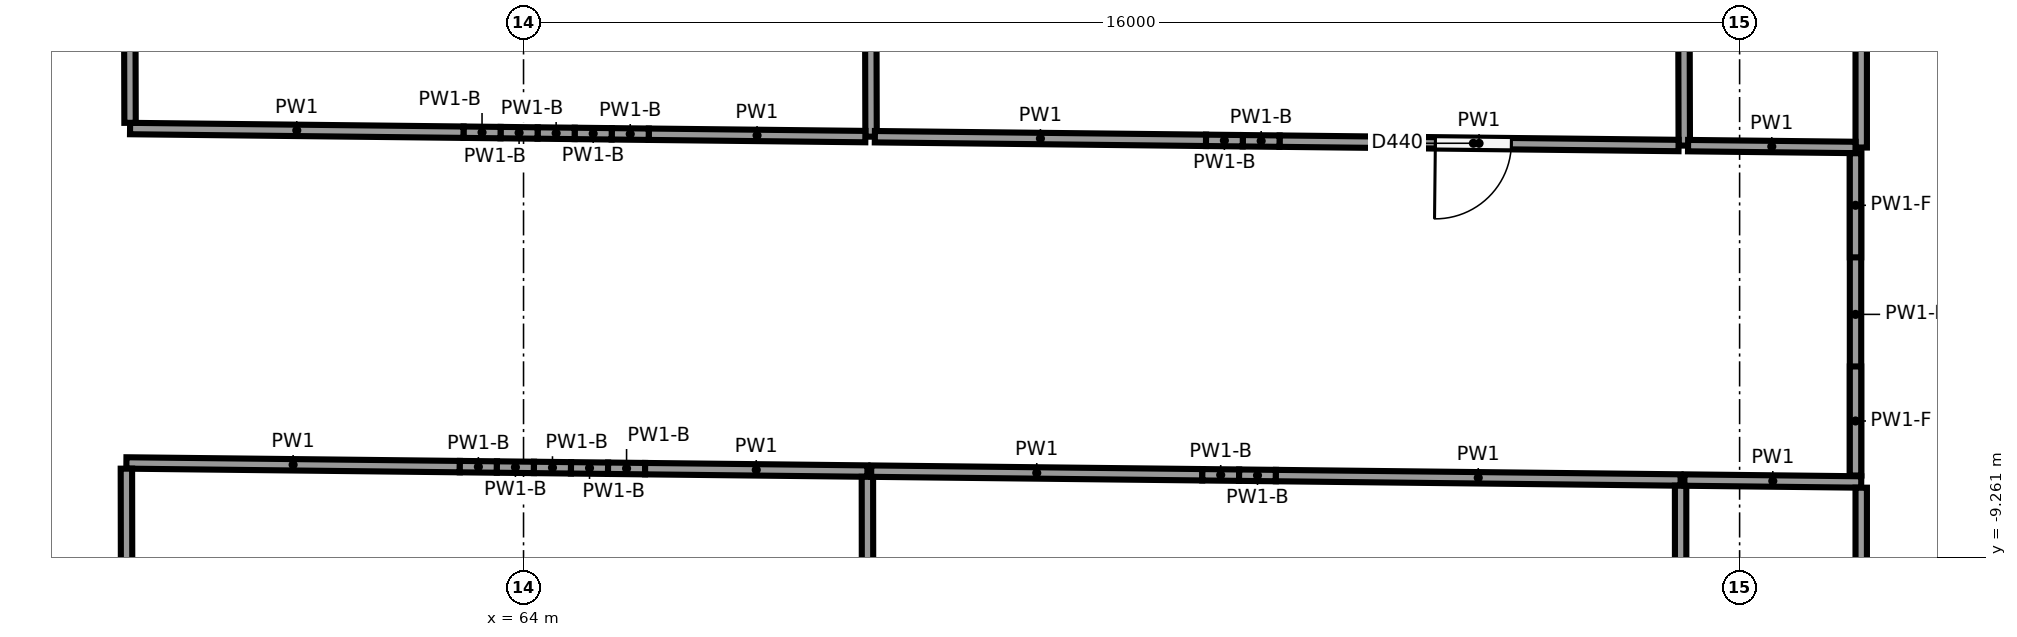
"""IFC4 building model, lengths in metres.
Left out: names, types, materials, properties, quantities, classifications, styles, units other than length and angle.
Written with IfcOpenShell. Run it as: python <this file> out.ifc"""

import sys

from ifc_helpers import new_model, si_unit, direction, frame, frame_2d, origin, origin_2d, place, context, subcontext, project, spatial, rectangle, circle, extrude, element, fill, save


model = new_model("IFC4")
c1 = context("Model", 3, precision=1e-05, world=origin(), true_north=direction((0.0, 1.0)))
c2 = subcontext(c1, "Body", "Model", "MODEL_VIEW")
j1 = project(units=[si_unit("LENGTHUNIT", "METRE"), si_unit("PLANEANGLEUNIT", "RADIAN")], contexts=[c1])
p1 = place(None, origin())
s1 = spatial("IfcSite", under=j1, at=p1, CompositionType="ELEMENT")
p2 = place(p1, origin())
s2 = spatial("IfcBuilding", under=s1, at=p2, CompositionType="ELEMENT")
p3 = place(p2, frame((0.0, 0.0, -4.0)))
s3 = spatial("IfcBuildingStorey", under=s2, at=p3, CompositionType="ELEMENT", Elevation=-4.0)
for number, where, z_axis, x_axis in (
    (1, (58.399, -5.816, -0.4), (0.0, 0.0, 1.0), (1.0, 0.0, 0.0)),
    (2, (63.599, -5.873, -0.4), (0.0, 0.0, 1.0), (1.0, 0.0, 0.0)),
):
    element("IfcColumn", number, at=place(p3, frame(where, z_axis=z_axis, x_axis=x_axis)), inside=s3, PredefinedType="COLUMN", context=c2, shape_type="SweptSolid", body=[
        extrude(circle(Radius=0.45, at=origin_2d()), origin(), (0.0, 0.0, 1.0), 4.4),
    ])
p4 = place(p3, frame((64.899, -5.887, -0.4), z_axis=(0.0, 0.0, 1.0), x_axis=(1.0, 0.0, 0.0)))
e3 = element("IfcColumn", 3, at=p4, inside=s3, PredefinedType="COLUMN", context=c2, shape_type="SweptSolid", body=[
    extrude(circle(Radius=0.4, at=origin_2d()), origin(), (0.0, 0.0, 1.0), 4.4),
])
p5 = place(p3, frame((73.498, -5.981, -0.4), z_axis=(0.0, 0.0, 1.0), x_axis=(1.0, 0.0, 0.0)))
e4 = element("IfcColumn", 4, at=p5, inside=s3, PredefinedType="COLUMN", context=c2, shape_type="SweptSolid", body=[
    extrude(circle(Radius=0.45, at=origin_2d()), origin(), (0.0, 0.0, 1.0), 4.4),
])
p6 = place(p3, frame((58.775, -8.02, 0.0), z_axis=(0.0, 0.0, 1.0), x_axis=(0.999939914849, -0.010962056941, 0.0)))
e5 = element("IfcWall", 5, at=p6, inside=s3, PredefinedType="PARTITIONING", context=c2, shape_type="SweptSolid", body=[
    extrude(rectangle(XDim=4.387, YDim=0.15, at=frame_2d((2.194, 0.0))), origin(), (0.0, 0.0, 1.0), 3.6),
])
p7 = place(p3, frame((63.162, -8.068, 0.0), z_axis=(0.0, 0.0, 1.0), x_axis=(0.999939262806, -0.01102137464, 0.0)))
e6 = element("IfcWall", 6, at=p7, inside=s3, PredefinedType="PARTITIONING", context=c2, shape_type="SweptSolid", body=[
    extrude(rectangle(XDim=0.487, YDim=0.15, at=frame_2d((0.244, 0.0))), origin(), (0.0, 0.0, 1.0), 2.5),
])
for number, where, z_axis, x_axis in (
    (7, (63.649, -8.073, 0.0), (0.0, 0.0, 1.0), (1.0, -0.011, 0.0)),
    (8, (64.137, -8.079, 0.0), (0.0, 0.0, 1.0), (1.0, -0.011, 0.0)),
):
    element("IfcWall", number, at=place(p3, frame(where, z_axis=z_axis, x_axis=x_axis)), inside=s3, PredefinedType="PARTITIONING", context=c2, shape_type="SweptSolid", body=[
        extrude(rectangle(XDim=0.488, YDim=0.15, at=frame_2d((0.244, 0.0))), origin(), (0.0, 0.0, 1.0), 2.5),
    ])
p8 = place(p3, frame((64.625, -8.084, 0.0), z_axis=(0.0, 0.0, 1.0), x_axis=(0.999939262806, -0.01102137464, 0.0)))
e9 = element("IfcWall", 9, at=p8, inside=s3, PredefinedType="PARTITIONING", context=c2, shape_type="SweptSolid", body=[
    extrude(rectangle(XDim=0.487, YDim=0.15, at=frame_2d((0.244, 0.0))), origin(), (0.0, 0.0, 1.0), 2.5),
])
p9 = place(p3, frame((65.112, -8.09, 0.0), z_axis=(0.0, 0.0, 1.0), x_axis=(0.999939323614, -0.011015856344, 0.0)))
e10 = element("IfcWall", 10, at=p9, inside=s3, PredefinedType="PARTITIONING", context=c2, shape_type="SweptSolid", body=[
    extrude(rectangle(XDim=0.488, YDim=0.15, at=frame_2d((0.244, 0.0))), origin(), (0.0, 0.0, 1.0), 2.5),
])
p10 = place(p3, frame((65.599, -8.095, 0.0), z_axis=(0.0, 0.0, 1.0), x_axis=(0.999940219435, -0.010934237792, 0.0)))
e11 = element("IfcWall", 11, at=p10, inside=s3, PredefinedType="PARTITIONING", context=c2, shape_type="SweptSolid", body=[
    extrude(rectangle(XDim=2.925, YDim=0.15, at=frame_2d((1.462, 0.0))), origin(), (0.0, 0.0, 1.0), 3.6),
])
p11 = place(p3, frame((68.524, -8.202, 0.0), z_axis=(0.0, 0.0, 1.0), x_axis=(0.001127273963, -0.999999364627, 0.0)))
e12 = element("IfcWall", 12, at=p11, inside=s3, PredefinedType="PARTITIONING", context=c2, shape_type="SweptSolid", body=[
    extrude(rectangle(XDim=9.096, YDim=0.15, at=frame_2d((4.548, 0.0))), origin(), (0.0, 0.0, 1.0), 3.6),
])
p12 = place(p3, frame((58.79, -16.963, 0.0), z_axis=(0.0, 0.0, 1.0), x_axis=(-0.001651752736, 0.999998635856, 0.0)))
e13 = element("IfcWall", 13, at=p12, inside=s3, PredefinedType="PARTITIONING", context=c2, shape_type="SweptSolid", body=[
    extrude(rectangle(XDim=8.868, YDim=0.15, at=frame_2d((4.434, 0.0))), origin(), (0.0, 0.0, 1.0), 3.6),
])
p13 = place(p3, frame((68.574, -8.127, 0.0), z_axis=(0.0, 0.0, 1.0), x_axis=(0.999939687164, -0.010982806315, 0.0)))
e14 = element("IfcWall", 14, at=p13, inside=s3, PredefinedType="PARTITIONING", context=c2, shape_type="SweptSolid", body=[
    extrude(rectangle(XDim=4.357, YDim=0.15, at=frame_2d((2.178, 0.0))), origin(), (0.0, 0.0, 1.0), 3.6),
])
p14 = place(p3, frame((72.931, -8.175, 0.0), z_axis=(0.0, 0.0, 1.0), x_axis=(0.999938401812, -0.011099215358, 0.0)))
e15 = element("IfcWall", 15, at=p14, inside=s3, PredefinedType="PARTITIONING", context=c2, shape_type="SweptSolid", body=[
    extrude(rectangle(XDim=0.484, YDim=0.15, at=frame_2d((0.242, 0.0))), origin(), (0.0, 0.0, 1.0), 2.5),
])
p15 = place(p3, frame((73.415, -8.181, 0.0), z_axis=(0.0, 0.0, 1.0), x_axis=(0.999943930506, -0.010589421352, 0.0)))
e16 = element("IfcWall", 16, at=p15, inside=s3, PredefinedType="PARTITIONING", context=c2, shape_type="SweptSolid", body=[
    extrude(rectangle(XDim=0.484, YDim=0.15, at=frame_2d((0.242, 0.0))), origin(), (0.0, 0.0, 1.0), 2.5),
])
p16 = place(p3, frame((73.899, -8.186, 0.0), z_axis=(0.0, 0.0, 1.0), x_axis=(0.999939460098, -0.011003460359, 0.0)))
e17 = element("IfcWall", 17, at=p16, inside=s3, PredefinedType="PARTITIONING", context=c2, shape_type="SweptSolid", body=[
    extrude(rectangle(XDim=5.325, YDim=0.15, at=frame_2d((2.663, 0.0))), origin(), (0.0, 0.0, 1.0), 3.6),
])
p17 = place(p3, frame((79.224, -8.319, 0.0), z_axis=(0.0, 0.0, 1.0), x_axis=(0.00057636878, -0.9999998339, 0.0)))
e18 = element("IfcWall", 18, at=p17, inside=s3, PredefinedType="PARTITIONING", context=c2, shape_type="SweptSolid", body=[
    extrude(rectangle(XDim=9.319, YDim=0.15, at=frame_2d((4.659, 0.0))), origin(), (0.0, 0.0, 1.0), 3.6),
])
p18 = place(p3, frame((79.274, -8.245, 0.0), z_axis=(0.0, 0.0, 1.0), x_axis=(0.999940447056, -0.010913401878, 0.0)))
e19 = element("IfcWall", 19, at=p18, inside=s3, PredefinedType="PARTITIONING", context=c2, shape_type="SweptSolid", body=[
    extrude(rectangle(XDim=2.327, YDim=0.15, at=frame_2d((1.163, 0.0))), origin(), (0.0, 0.0, 1.0), 3.6),
])
p19 = place(p3, frame((81.6, -8.345, 0.0), z_axis=(0.0, 0.0, 1.0), x_axis=(0.0, -1.0, 0.0)))
e20 = element("IfcWall", 20, at=p19, inside=s3, PredefinedType="PARTITIONING", context=c2, shape_type="SweptSolid", body=[
    extrude(rectangle(XDim=4.805, YDim=0.15, at=frame_2d((2.402, 0.0))), origin(), (0.0, 0.0, 1.0), 3.6),
])
p20 = place(p19, frame((1.95, 0.0, 0.0)))
e21 = element("IfcOpeningElement", 21, at=p20, cuts=e20, PredefinedType="OPENING", context=c2, shape_type="SweptSolid", body=[
    extrude(rectangle(XDim=1.0, YDim=2.1, at=frame_2d((0.5, 1.05))), frame((0.0, 0.085, 0.0), z_axis=(0.0, -1.0, 0.0), x_axis=(1.0, 0.0, 0.0)), (0.0, 0.0, 1.0), 0.17),
])
p21 = place(p3, frame((68.55, 5.444, 0.0), z_axis=(0.0, 0.0, 1.0), x_axis=(0.002502188243, -0.999996869522, 0.0)))
e22 = element("IfcWall", 22, at=p21, inside=s3, PredefinedType="PARTITIONING", context=c2, shape_type="SweptSolid", body=[
    extrude(rectangle(XDim=9.172, YDim=0.15, at=frame_2d((4.586, 0.0))), origin(), (0.0, 0.0, 1.0), 3.6),
])
p22 = place(p3, frame((68.498, -3.726, 0.0), z_axis=(0.0, 0.0, 1.0), x_axis=(-0.999939884591, 0.01096481669, 0.0)))
e23 = element("IfcWall", 23, at=p22, inside=s3, PredefinedType="PARTITIONING", context=c2, shape_type="SweptSolid", body=[
    extrude(rectangle(XDim=2.85, YDim=0.15, at=frame_2d((1.425, 0.0))), origin(), (0.0, 0.0, 1.0), 3.6),
])
for number, where, z_axis, x_axis in (
    (24, (65.648, -3.695, 0.0), (0.0, 0.0, 1.0), (-1.0, 0.011, 0.0)),
    (25, (65.16, -3.69, 0.0), (0.0, 0.0, 1.0), (-1.0, 0.011, 0.0)),
):
    element("IfcWall", number, at=place(p3, frame(where, z_axis=z_axis, x_axis=x_axis)), inside=s3, PredefinedType="PARTITIONING", context=c2, shape_type="SweptSolid", body=[
        extrude(rectangle(XDim=0.488, YDim=0.15, at=frame_2d((0.244, 0.0))), origin(), (0.0, 0.0, 1.0), 2.5),
    ])
p23 = place(p3, frame((64.673, -3.684, 0.0), z_axis=(0.0, 0.0, 1.0), x_axis=(-0.999944658431, 0.010520459833, 0.0)))
e26 = element("IfcWall", 26, at=p23, inside=s3, PredefinedType="PARTITIONING", context=c2, shape_type="SweptSolid", body=[
    extrude(rectangle(XDim=0.487, YDim=0.15, at=frame_2d((0.244, 0.0))), origin(), (0.0, 0.0, 1.0), 2.5),
])
for number, where, z_axis, x_axis in (
    (27, (64.185, -3.679, 0.0), (0.0, 0.0, 1.0), (-1.0, 0.012, 0.0)),
    (28, (63.698, -3.674, 0.0), (0.0, 0.0, 1.0), (-1.0, 0.011, 0.0)),
):
    element("IfcWall", number, at=place(p3, frame(where, z_axis=z_axis, x_axis=x_axis)), inside=s3, PredefinedType="PARTITIONING", context=c2, shape_type="SweptSolid", body=[
        extrude(rectangle(XDim=0.488, YDim=0.15, at=frame_2d((0.244, 0.0))), origin(), (0.0, 0.0, 1.0), 2.5),
    ])
p24 = place(p3, frame((63.21, -3.668, 0.0), z_axis=(0.0, 0.0, 1.0), x_axis=(-0.999939914849, 0.010962056941, 0.0)))
e29 = element("IfcWall", 29, at=p24, inside=s3, PredefinedType="PARTITIONING", context=c2, shape_type="SweptSolid", body=[
    extrude(rectangle(XDim=4.387, YDim=0.15, at=frame_2d((2.194, 0.0))), origin(), (0.0, 0.0, 1.0), 3.6),
])
p25 = place(p3, frame((58.823, -3.545, 0.0), z_axis=(0.0, 0.0, 1.0), x_axis=(-0.002560141365, 0.999996722833, 0.0)))
e30 = element("IfcWall", 30, at=p25, inside=s3, PredefinedType="PARTITIONING", context=c2, shape_type="SweptSolid", body=[
    extrude(rectangle(XDim=8.869, YDim=0.15, at=frame_2d((4.434, 0.0))), origin(), (0.0, 0.0, 1.0), 3.6),
])
p26 = place(p25, frame((3.95, 0.0, 0.0)))
e31 = element("IfcOpeningElement", 31, at=p26, cuts=e30, PredefinedType="OPENING", context=c2, shape_type="SweptSolid", body=[
    extrude(rectangle(XDim=1.0, YDim=2.1, at=frame_2d((0.5, 1.05))), frame((0.0, 0.085, 0.0), z_axis=(0.0, -1.0, 0.0), x_axis=(1.0, 0.0, 0.0)), (0.0, 0.0, 1.0), 0.17),
])
p27 = place(p3, frame((79.249, 5.55, 0.0), z_axis=(0.0, 0.0, 1.0), x_axis=(0.002442883638, -0.999997016155, 0.0)))
e32 = element("IfcWall", 32, at=p27, inside=s3, PredefinedType="PARTITIONING", context=c2, shape_type="SweptSolid", body=[
    extrude(rectangle(XDim=9.394, YDim=0.15, at=frame_2d((4.697, 0.0))), origin(), (0.0, 0.0, 1.0), 3.6),
])
p28 = place(p3, frame((79.197, -3.844, 0.0), z_axis=(0.0, 0.0, 1.0), x_axis=(-0.999939777793, 0.010974551809, 0.0)))
e33 = element("IfcWall", 33, at=p28, inside=s3, PredefinedType="PARTITIONING", context=c2, shape_type="SweptSolid", body=[
    extrude(rectangle(XDim=5.25, YDim=0.15, at=frame_2d((2.625, 0.0))), origin(), (0.0, 0.0, 1.0), 3.6),
])
p29 = place(p28, frame((2.2, 0.0, 0.0)))
e34 = element("IfcOpeningElement", 34, at=p29, cuts=e33, PredefinedType="OPENING", context=c2, shape_type="SweptSolid", body=[
    extrude(rectangle(XDim=1.0, YDim=2.1, at=frame_2d((0.5, 1.05))), frame((0.0, 0.085, 0.0), z_axis=(0.0, -1.0, 0.0), x_axis=(1.0, 0.0, 0.0)), (0.0, 0.0, 1.0), 0.17),
])
p30 = place(p3, frame((73.947, -3.786, 0.0), z_axis=(0.0, 0.0, 1.0), x_axis=(-0.999938401812, 0.011099215358, 0.0)))
e35 = element("IfcWall", 35, at=p30, inside=s3, PredefinedType="PARTITIONING", context=c2, shape_type="SweptSolid", body=[
    extrude(rectangle(XDim=0.484, YDim=0.15, at=frame_2d((0.242, 0.0))), origin(), (0.0, 0.0, 1.0), 2.5),
])
p31 = place(p3, frame((73.463, -3.781, 0.0), z_axis=(0.0, 0.0, 1.0), x_axis=(-0.999938463917, 0.011093618863, 0.0)))
e36 = element("IfcWall", 36, at=p31, inside=s3, PredefinedType="PARTITIONING", context=c2, shape_type="SweptSolid", body=[
    extrude(rectangle(XDim=0.484, YDim=0.15, at=frame_2d((0.242, 0.0))), origin(), (0.0, 0.0, 1.0), 2.5),
])
p32 = place(p3, frame((72.979, -3.775, 0.0), z_axis=(0.0, 0.0, 1.0), x_axis=(-0.999940300976, 0.010926778296, 0.0)))
e37 = element("IfcWall", 37, at=p32, inside=s3, PredefinedType="PARTITIONING", context=c2, shape_type="SweptSolid", body=[
    extrude(rectangle(XDim=4.357, YDim=0.15, at=frame_2d((2.178, 0.0))), origin(), (0.0, 0.0, 1.0), 3.6),
])
p33 = place(p3, frame((81.6, 0.575, 0.0), z_axis=(0.0, 0.0, 1.0), x_axis=(0.0, -1.0, 0.0)))
e38 = element("IfcWall", 38, at=p33, inside=s3, PredefinedType="PARTITIONING", context=c2, shape_type="SweptSolid", body=[
    extrude(rectangle(XDim=4.445, YDim=0.15, at=frame_2d((2.223, 0.0))), origin(), (0.0, 0.0, 1.0), 3.6),
])
p34 = place(p3, frame((81.525, -3.869, 0.0), z_axis=(0.0, 0.0, 1.0), x_axis=(-0.999941036186, 0.010859288735, 0.0)))
e39 = element("IfcWall", 39, at=p34, inside=s3, PredefinedType="PARTITIONING", context=c2, shape_type="SweptSolid", body=[
    extrude(rectangle(XDim=2.203, YDim=0.15, at=frame_2d((1.102, 0.0))), origin(), (0.0, 0.0, 1.0), 3.6),
])
p35 = place(p3, frame((81.525, -3.945, 0.0), z_axis=(0.0, 0.0, 1.0), x_axis=(0.0, -1.0, 0.0)))
e40 = element("IfcWall", 40, at=p35, inside=s3, PredefinedType="PARTITIONING", context=c2, shape_type="SweptSolid", body=[
    extrude(rectangle(XDim=4.24, YDim=0.15, at=frame_2d((2.12, 0.0))), origin(), (0.0, 0.0, 1.0), 2.5),
])
p36 = place(p3, frame((81.525, -3.945, 2.5), z_axis=(0.0, 0.0, 1.0), x_axis=(0.0, -1.0, 0.0)))
e41 = element("IfcWall", 41, at=p36, inside=s3, PredefinedType="PARTITIONING", context=c2, shape_type="SweptSolid", body=[
    extrude(rectangle(XDim=1.37, YDim=0.15, at=frame_2d((0.685, 0.0))), origin(), (0.0, 0.0, 1.0), 1.1),
])
p37 = place(p3, frame((81.525, -6.75, 2.5), z_axis=(0.0, 0.0, 1.0), x_axis=(0.0, -1.0, 0.0)))
e42 = element("IfcWall", 42, at=p37, inside=s3, PredefinedType="PARTITIONING", context=c2, shape_type="SweptSolid", body=[
    extrude(rectangle(XDim=1.435, YDim=0.15, at=frame_2d((0.718, 0.0))), origin(), (0.0, 0.0, 1.0), 1.1),
])
p38 = place(p29, origin())
e43 = element("IfcDoor", 43, at=p38, inside=s3, OperationType="SINGLE_SWING_RIGHT", PredefinedType="DOOR", context=c2, shape_type="SweptSolid", body=[
    extrude(rectangle(XDim=1.0, YDim=2.1, at=frame_2d((0.5, 1.05))), frame((0.0, 0.025, 0.0), z_axis=(0.0, -1.0, 0.0), x_axis=(1.0, 0.0, 0.0)), (0.0, 0.0, 1.0), 0.05),
])
fill(e34, e43)
save(model, sys.argv[1])
